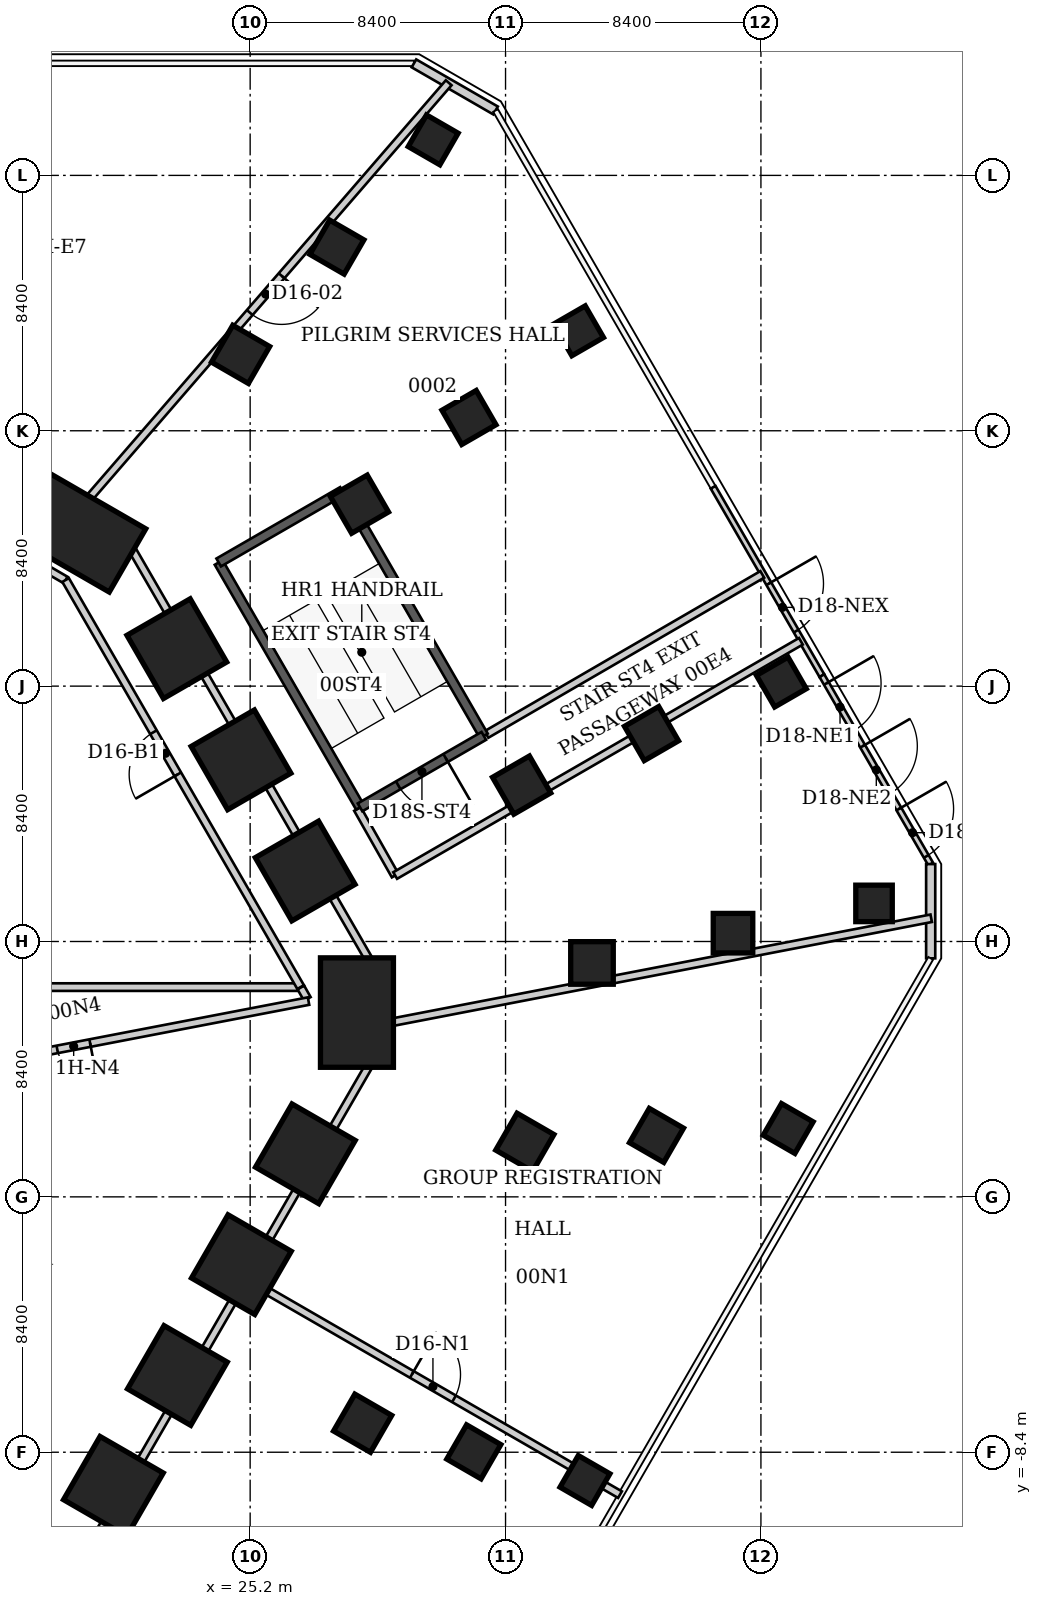
"""IFC4 building model, lengths in metres.
Left out: names, types, materials, properties, quantities, classifications, styles, units other than length and angle.
Written with IfcOpenShell. Run it as: python <this file> out.ifc"""

import sys

from ifc_helpers import new_model, si_unit, direction, frame, frame_2d, origin, origin_2d, place, context, subcontext, project, spatial, rectangle, extrude, element, fill, save


model = new_model("IFC4")
c1 = context("Model", 3, precision=1e-05, world=origin(), true_north=direction((0.0, 1.0)))
c2 = subcontext(c1, "Body", "Model", "MODEL_VIEW")
j1 = project(units=[si_unit("LENGTHUNIT", "METRE"), si_unit("PLANEANGLEUNIT", "RADIAN")], contexts=[c1])
p1 = place(None, origin())
s1 = spatial("IfcSite", under=j1, at=p1, CompositionType="ELEMENT")
p2 = place(p1, origin())
s2 = spatial("IfcBuilding", under=s1, at=p2, CompositionType="ELEMENT")
p3 = place(p2, origin())
s3 = spatial("IfcBuildingStorey", under=s2, at=p3, CompositionType="ELEMENT", Elevation=0.0)
p4 = place(p3, frame((19.606, 21.835, -0.2), z_axis=(0.0, 0.0, 1.0), x_axis=(0.5, 0.866025403784, 0.0)))
e1 = element("IfcColumn", 1, at=p4, inside=s3, PredefinedType="COLUMN", context=c2, shape_type="SweptSolid", body=[
    extrude(rectangle(XDim=2.4, YDim=3.6, at=origin_2d()), origin(), (0.0, 0.0, 1.0), 6.2),
])
for number, where, z_axis, x_axis in (
    (2, (22.788, 18.032, -0.2), (0.0, 0.0, 1.0), (0.866, 0.5, 0.0)),
    (3, (24.899, 14.375, -0.2), (0.0, 0.0, 1.0), (0.866, 0.5, 0.0)),
    (4, (27.01, 10.719, -0.2), (0.0, 0.0, 1.0), (0.866, 0.5, 0.0)),
):
    element("IfcColumn", number, at=place(p3, frame(where, z_axis=z_axis, x_axis=x_axis)), inside=s3, PredefinedType="COLUMN", context=c2, shape_type="SweptSolid", body=[
        extrude(rectangle(XDim=2.4, YDim=2.4, at=origin_2d()), origin(), (0.0, 0.0, 1.0), 6.2),
    ])
p5 = place(p3, frame((28.713, 6.062, -0.2), z_axis=(0.0, 0.0, 1.0), x_axis=(1.0, 0.0, 0.0)))
e5 = element("IfcColumn", 5, at=p5, inside=s3, PredefinedType="COLUMN", context=c2, shape_type="SweptSolid", body=[
    extrude(rectangle(XDim=2.4, YDim=3.6, at=origin_2d()), origin(), (0.0, 0.0, 1.0), 6.2),
])
for number, where, z_axis, x_axis in (
    (6, (27.016, 1.416, -0.2), (0.0, 0.0, 1.0), (0.866, -0.5, 0.0)),
    (7, (24.911, -2.23, -0.2), (0.0, 0.0, 1.0), (0.866, -0.5, 0.0)),
    (8, (22.806, -5.875, -0.2), (0.0, 0.0, 1.0), (0.866, -0.5, 0.0)),
    (9, (20.701, -9.521, -0.2), (0.0, 0.0, 1.0), (0.866, -0.5, 0.0)),
):
    element("IfcColumn", number, at=place(p3, frame(where, z_axis=z_axis, x_axis=x_axis)), inside=s3, PredefinedType="COLUMN", context=c2, shape_type="SweptSolid", body=[
        extrude(rectangle(XDim=2.4, YDim=2.4, at=origin_2d()), origin(), (0.0, 0.0, 1.0), 6.2),
    ])
for number, where, z_axis, x_axis in (
    (10, (24.885, 27.714, -0.2), (0.0, 0.0, 1.0), (0.5, 0.866, 0.0)),
    (11, (28.794, 22.785, -0.2), (0.0, 0.0, 1.0), (0.866, 0.5, 0.0)),
    (12, (34.129, 13.544, -0.2), (0.0, 0.0, 1.0), (0.866, 0.5, 0.0)),
    (13, (36.443, 7.694, -0.2), (0.0, 0.0, 1.0), (1.0, 0.0, 0.0)),
    (14, (34.235, 1.795, -0.2), (0.0, 0.0, 1.0), (0.866, -0.5, 0.0)),
    (15, (28.9, -7.445, -0.2), (0.0, 0.0, 1.0), (0.866, -0.5, 0.0)),
):
    element("IfcColumn", number, at=place(p3, frame(where, z_axis=z_axis, x_axis=x_axis)), inside=s3, PredefinedType="COLUMN", context=c2, shape_type="SweptSolid", body=[
        extrude(rectangle(XDim=1.4, YDim=1.4, at=origin_2d()), origin(), (0.0, 0.0, 1.0), 6.2),
    ])
for number, where, z_axis, x_axis in (
    (16, (28.052, 31.241, -0.2), (0.0, 0.0, 1.0), (0.5, 0.866, 0.0)),
    (17, (32.397, 25.636, -0.2), (0.0, 0.0, 1.0), (0.866, 0.5, 0.0)),
    (18, (38.4, 15.239, -0.2), (0.0, 0.0, 1.0), (0.866, 0.5, 0.0)),
    (19, (41.082, 8.674, -0.2), (0.0, 0.0, 1.0), (1.0, 0.0, 0.0)),
    (20, (38.566, 2.022, -0.2), (0.0, 0.0, 1.0), (0.866, -0.5, 0.0)),
    (21, (32.556, -8.387, -0.2), (0.0, 0.0, 1.0), (0.866, -0.5, 0.0)),
):
    element("IfcColumn", number, at=place(p3, frame(where, z_axis=z_axis, x_axis=x_axis)), inside=s3, PredefinedType="COLUMN", context=c2, shape_type="SweptSolid", body=[
        extrude(rectangle(XDim=1.3, YDim=1.3, at=origin_2d()), origin(), (0.0, 0.0, 1.0), 6.2),
    ])
for number, where, z_axis, x_axis in (
    (22, (31.22, 34.768, -0.2), (0.0, 0.0, 1.0), (0.5, 0.866, 0.0)),
    (23, (36.001, 28.488, -0.2), (0.0, 0.0, 1.0), (0.866, 0.5, 0.0)),
    (24, (42.672, 16.934, -0.2), (0.0, 0.0, 1.0), (0.866, 0.5, 0.0)),
    (25, (45.72, 9.653, -0.2), (0.0, 0.0, 1.0), (1.0, 0.0, 0.0)),
    (26, (42.897, 2.249, -0.2), (0.0, 0.0, 1.0), (0.866, -0.5, 0.0)),
    (27, (36.212, -9.329, -0.2), (0.0, 0.0, 1.0), (0.866, -0.5, 0.0)),
):
    element("IfcColumn", number, at=place(p3, frame(where, z_axis=z_axis, x_axis=x_axis)), inside=s3, PredefinedType="COLUMN", context=c2, shape_type="SweptSolid", body=[
        extrude(rectangle(XDim=1.2, YDim=1.2, at=origin_2d()), origin(), (0.0, 0.0, 1.0), 6.2),
    ])
p6 = place(p3, frame((30.587, 37.285, 0.0), z_axis=(0.0, 0.0, 1.0), x_axis=(0.866063626216, -0.499933790963, 0.0)))
e28 = element("IfcWall", 28, at=p6, inside=s3, PredefinedType="SOLIDWALL", context=c2, shape_type="SweptSolid", body=[
    extrude(rectangle(XDim=3.1, YDim=0.3, at=frame_2d((1.55, 0.0))), origin(), (0.0, 0.0, 1.0), 5.84),
])
p7 = place(p3, frame((40.428, 23.341, 0.0), z_axis=(0.0, 0.0, 1.0), x_axis=(0.499988249127, -0.866032188048, 0.0)))
e29 = element("IfcWall", 29, at=p7, inside=s3, PredefinedType="SOLIDWALL", context=c2, shape_type="SweptSolid", body=[
    extrude(rectangle(XDim=7.156, YDim=0.18, at=frame_2d((3.578, 0.0))), origin(), (0.0, 0.0, 1.0), 5.84),
])
p8 = place(p7, frame((3.661, 0.0, 0.0)))
e30 = element("IfcOpeningElement", 30, at=p8, cuts=e29, PredefinedType="OPENING", context=c2, shape_type="SweptSolid", body=[
    extrude(rectangle(XDim=1.8, YDim=2.7, at=frame_2d((0.9, 1.35))), frame((0.0, 0.09, 0.0), z_axis=(0.0, -1.0, 0.0), x_axis=(1.0, 0.0, 0.0)), (0.0, 0.0, 1.0), 0.18),
])
p9 = place(p3, frame((44.006, 17.144, 0.0), z_axis=(0.0, 0.0, 1.0), x_axis=(0.500013836808, -0.866017414952, 0.0)))
e31 = element("IfcWall", 31, at=p9, inside=s3, PredefinedType="SOLIDWALL", context=c2, shape_type="SweptSolid", body=[
    extrude(rectangle(XDim=7.156, YDim=0.18, at=frame_2d((3.578, 0.0))), origin(), (0.0, 0.0, 1.0), 5.84),
])
p10 = place(p9, frame((0.293, 0.0, 0.0)))
e32 = element("IfcOpeningElement", 32, at=p10, cuts=e31, PredefinedType="OPENING", context=c2, shape_type="SweptSolid", body=[
    extrude(rectangle(XDim=1.8, YDim=2.7, at=frame_2d((0.9, 1.35))), frame((0.0, 0.09, 0.0), z_axis=(0.0, -1.0, 0.0), x_axis=(1.0, 0.0, 0.0)), (0.0, 0.0, 1.0), 0.18),
])
p11 = place(p9, frame((2.678, 0.0, 0.0)))
e33 = element("IfcOpeningElement", 33, at=p11, cuts=e31, PredefinedType="OPENING", context=c2, shape_type="SweptSolid", body=[
    extrude(rectangle(XDim=1.8, YDim=2.7, at=frame_2d((0.9, 1.35))), frame((0.0, 0.09, 0.0), z_axis=(0.0, -1.0, 0.0), x_axis=(1.0, 0.0, 0.0)), (0.0, 0.0, 1.0), 0.18),
])
p12 = place(p9, frame((5.063, 0.0, 0.0)))
e34 = element("IfcOpeningElement", 34, at=p12, cuts=e31, PredefinedType="OPENING", context=c2, shape_type="SweptSolid", body=[
    extrude(rectangle(XDim=1.8, YDim=2.7, at=frame_2d((0.9, 1.35))), frame((0.0, 0.09, 0.0), z_axis=(0.0, -1.0, 0.0), x_axis=(1.0, 0.0, 0.0)), (0.0, 0.0, 1.0), 0.18),
])
p13 = place(p3, frame((47.584, 10.946, 0.0), z_axis=(0.0, 0.0, 1.0), x_axis=(0.0, -1.0, 0.0)))
e35 = element("IfcWall", 35, at=p13, inside=s3, PredefinedType="SOLIDWALL", context=c2, shape_type="SweptSolid", body=[
    extrude(rectangle(XDim=3.1, YDim=0.3, at=frame_2d((1.55, 0.0))), origin(), (0.0, 0.0, 1.0), 5.84),
])
p14 = place(p3, frame((17.07, -16.52, 0.0), z_axis=(0.0, 0.0, 1.0), x_axis=(0.500243727505, 0.865884641908, 0.0)))
e36 = element("IfcWall", 36, at=p14, inside=s3, PredefinedType="PARTITIONING", context=c2, shape_type="SweptSolid", body=[
    extrude(rectangle(XDim=15.972, YDim=0.25, at=frame_2d((7.986, 0.0))), origin(), (0.0, 0.0, 1.0), 4.04),
])
p15 = place(p3, frame((18.51, 20.65, 0.0), z_axis=(0.0, 0.0, 1.0), x_axis=(0.864827114446, -0.502069778138, 0.0)))
e37 = element("IfcWall", 37, at=p15, inside=s3, PredefinedType="PARTITIONING", context=c2, shape_type="SweptSolid", body=[
    extrude(rectangle(XDim=0.717, YDim=0.25, at=frame_2d((0.358, 0.0))), origin(), (0.0, 0.0, 1.0), 5.84),
])
p16 = place(p3, frame((19.15, 23.05, 0.0), z_axis=(0.0, 0.0, 1.0), x_axis=(-1.0, 0.0, 0.0)))
e38 = element("IfcWall", 38, at=p16, inside=s3, PredefinedType="PARTITIONING", context=c2, shape_type="SweptSolid", body=[
    extrude(rectangle(XDim=15.15, YDim=0.25, at=frame_2d((7.575, 0.0))), origin(), (0.0, 0.0, 1.0), 4.04),
])
p17 = place(p3, frame((19.15, 23.05, 0.0), z_axis=(0.0, 0.0, 1.0), x_axis=(0.86570107998, -0.500561325036, 0.0)))
e39 = element("IfcWall", 39, at=p17, inside=s3, PredefinedType="PARTITIONING", context=c2, shape_type="SweptSolid", body=[
    extrude(rectangle(XDim=0.588, YDim=0.25, at=frame_2d((0.294, 0.0))), origin(), (0.0, 0.0, 1.0), 5.84),
])
p18 = place(p3, frame((19.69, 22.74, 0.0), z_axis=(0.0, 0.0, 1.0), x_axis=(0.865102050426, -0.501595895466, 0.0)))
e40 = element("IfcWall", 40, at=p18, inside=s3, PredefinedType="PARTITIONING", context=c2, shape_type="SweptSolid", body=[
    extrude(rectangle(XDim=1.375, YDim=0.25, at=frame_2d((0.688, 0.0))), origin(), (0.0, 0.0, 1.0), 5.84),
])
p19 = place(p3, frame((25.06, -2.69, 0.0), z_axis=(0.0, 0.0, 1.0), x_axis=(0.500462066422, 0.865758465204, 0.0)))
e41 = element("IfcWall", 41, at=p19, inside=s3, PredefinedType="PARTITIONING", context=c2, shape_type="SweptSolid", body=[
    extrude(rectangle(XDim=8.952, YDim=0.25, at=frame_2d((4.476, 0.0))), origin(), (0.0, 0.0, 1.0), 4.04),
])
p20 = place(p3, frame((25.06, -2.69, 0.0), z_axis=(0.0, 0.0, 1.0), x_axis=(0.865986126124, -0.500068024733, 0.0)))
e42 = element("IfcWall", 42, at=p20, inside=s3, PredefinedType="PARTITIONING", context=c2, shape_type="SweptSolid", body=[
    extrude(rectangle(XDim=14.208, YDim=0.25, at=frame_2d((7.104, 0.0))), origin(), (0.0, 0.0, 1.0), 5.75),
])
p21 = place(p20, frame((6.304, 0.0, 0.0)))
e43 = element("IfcOpeningElement", 43, at=p21, cuts=e42, PredefinedType="OPENING", context=c2, shape_type="SweptSolid", body=[
    extrude(rectangle(XDim=1.6, YDim=2.4, at=frame_2d((0.8, 1.2))), frame((0.0, 0.125, 0.0), z_axis=(0.0, -1.0, 0.0), x_axis=(1.0, 0.0, 0.0)), (0.0, 0.0, 1.0), 0.25),
])
p22 = place(p3, frame((26.85, 6.9, 0.0), z_axis=(0.0, 0.0, 1.0), x_axis=(-1.0, 0.0, 0.0)))
e44 = element("IfcWall", 44, at=p22, inside=s3, PredefinedType="PARTITIONING", context=c2, shape_type="SweptSolid", body=[
    extrude(rectangle(XDim=15.18, YDim=0.25, at=frame_2d((7.59, 0.0))), origin(), (0.0, 0.0, 1.0), 5.84),
])
p23 = place(p3, frame((26.86, 6.9, 0.0), z_axis=(0.0, 0.0, 1.0), x_axis=(-0.499972135205, 0.866041490934, 0.0)))
e45 = element("IfcWall", 45, at=p23, inside=s3, PredefinedType="PARTITIONING", context=c2, shape_type="SweptSolid", body=[
    extrude(rectangle(XDim=15.461, YDim=0.25, at=frame_2d((7.731, 0.0))), origin(), (0.0, 0.0, 1.0), 5.84),
])
p24 = place(p23, frame((8.081, 0.0, 0.0)))
e46 = element("IfcOpeningElement", 46, at=p24, cuts=e45, PredefinedType="OPENING", context=c2, shape_type="SweptSolid", body=[
    extrude(rectangle(XDim=1.6, YDim=2.4, at=frame_2d((0.8, 1.2))), frame((0.0, 0.125, 0.0), z_axis=(0.0, -1.0, 0.0), x_axis=(1.0, 0.0, 0.0)), (0.0, 0.0, 1.0), 0.25),
])
p25 = place(p3, frame((26.867, 6.887, 0.0), z_axis=(0.0, 0.0, 1.0), x_axis=(0.49170458892, -0.870762078432, 0.0)))
e47 = element("IfcWall", 47, at=p25, inside=s3, PredefinedType="PARTITIONING", context=c2, shape_type="SweptSolid", body=[
    extrude(rectangle(XDim=0.433, YDim=0.25, at=frame_2d((0.217, 0.0))), origin(), (0.0, 0.0, 1.0), 5.84),
])
p26 = place(p3, frame((27.12, 6.44, 0.0), z_axis=(0.0, 0.0, 1.0), x_axis=(-0.982020832849, -0.188772571765, 0.0)))
e48 = element("IfcWall", 48, at=p26, inside=s3, PredefinedType="PARTITIONING", context=c2, shape_type="SweptSolid", body=[
    extrude(rectangle(XDim=15.733, YDim=0.25, at=frame_2d((7.867, 0.0))), origin(), (0.0, 0.0, 1.0), 5.84),
])
p27 = place(p26, frame((7.316, 0.0, 0.0)))
e49 = element("IfcOpeningElement", 49, at=p27, cuts=e48, PredefinedType="OPENING", context=c2, shape_type="SweptSolid", body=[
    extrude(rectangle(XDim=1.1, YDim=2.2, at=frame_2d((0.55, 1.1))), frame((0.0, 0.125, 0.0), z_axis=(0.0, -1.0, 0.0), x_axis=(1.0, 0.0, 0.0)), (0.0, 0.0, 1.0), 0.25),
])
p28 = place(p3, frame((28.73, 12.76, 0.0), z_axis=(0.0, 0.0, 1.0), x_axis=(0.492718818431, -0.87018858069, 0.0)))
e50 = element("IfcWall", 50, at=p28, inside=s3, PredefinedType="PARTITIONING", context=c2, shape_type="SweptSolid", body=[
    extrude(rectangle(XDim=2.517, YDim=0.25, at=frame_2d((1.258, 0.0))), origin(), (0.0, 0.0, 1.0), 5.84),
])
p29 = place(p3, frame((29.54, 5.06, 0.0), z_axis=(0.0, 0.0, 1.0), x_axis=(0.0, 1.0, 0.0)))
e51 = element("IfcWall", 51, at=p29, inside=s3, PredefinedType="PARTITIONING", context=c2, shape_type="SweptSolid", body=[
    extrude(rectangle(XDim=0.585, YDim=0.25, at=frame_2d((0.292, 0.0))), origin(), (0.0, 0.0, 1.0), 5.84),
])
p30 = place(p3, frame((29.54, 5.68, 0.0), z_axis=(0.0, 0.0, 1.0), x_axis=(0.0, 1.0, 0.0)))
e52 = element("IfcWall", 52, at=p30, inside=s3, PredefinedType="PARTITIONING", context=c2, shape_type="SweptSolid", body=[
    extrude(rectangle(XDim=1.38, YDim=0.25, at=frame_2d((0.69, 0.0))), origin(), (0.0, 0.0, 1.0), 5.84),
])
p31 = place(p3, frame((29.54, 7.06, 0.0), z_axis=(0.0, 0.0, 1.0), x_axis=(-0.500235539918, 0.865889372035, 0.0)))
e53 = element("IfcWall", 53, at=p31, inside=s3, PredefinedType="PARTITIONING", context=c2, shape_type="SweptSolid", body=[
    extrude(rectangle(XDim=17.312, YDim=0.25, at=frame_2d((8.656, 0.0))), origin(), (0.0, 0.0, 1.0), 4.04),
])
p32 = place(p3, frame((29.97, 10.57, 0.0), z_axis=(0.0, 0.0, 1.0), x_axis=(0.866006423824, 0.500032872815, 0.0)))
e54 = element("IfcWall", 54, at=p32, inside=s3, PredefinedType="PARTITIONING", context=c2, shape_type="SweptSolid", body=[
    extrude(rectangle(XDim=15.409, YDim=0.25, at=frame_2d((7.704, 0.0))), origin(), (0.0, 0.0, 1.0), 5.083),
])
p33 = place(p3, frame((31.73, 36.647, 0.0), z_axis=(0.0, 0.0, 1.0), x_axis=(-0.654545432473, -0.75602266952, 0.0)))
e55 = element("IfcWall", 55, at=p33, inside=s3, PredefinedType="PARTITIONING", context=c2, shape_type="SweptSolid", body=[
    extrude(rectangle(XDim=18.395, YDim=0.25, at=frame_2d((9.198, 0.0))), origin(), (0.0, 0.0, 1.0), 5.75),
])
p34 = place(p33, frame((8.398, 0.0, 0.0)))
e56 = element("IfcOpeningElement", 56, at=p34, cuts=e55, PredefinedType="OPENING", context=c2, shape_type="SweptSolid", body=[
    extrude(rectangle(XDim=1.6, YDim=2.4, at=frame_2d((0.8, 1.2))), frame((0.0, 0.125, 0.0), z_axis=(0.0, -1.0, 0.0), x_axis=(1.0, 0.0, 0.0)), (0.0, 0.0, 1.0), 0.25),
])
p35 = place(p3, frame((42.044, 20.475, 0.0), z_axis=(0.0, 0.0, 1.0), x_axis=(-0.864887716018, -0.501965375978, 0.0)))
e57 = element("IfcWall", 57, at=p35, inside=s3, PredefinedType="PARTITIONING", context=c2, shape_type="SweptSolid", body=[
    extrude(rectangle(XDim=10.49, YDim=0.25, at=frame_2d((5.245, 0.0))), origin(), (0.0, 0.0, 1.0), 5.75),
])
p36 = place(p3, frame((47.601, 9.164, 0.0), z_axis=(0.0, 0.0, 1.0), x_axis=(-0.981893421599, -0.189434180181, 0.0)))
e58 = element("IfcWall", 58, at=p36, inside=s3, PredefinedType="PARTITIONING", context=c2, shape_type="SweptSolid", body=[
    extrude(rectangle(XDim=18.394, YDim=0.25, at=frame_2d((9.197, 0.0))), origin(), (0.0, 0.0, 1.0), 5.75),
])
p37 = place(p3, frame((28.815, 12.813, 0.0), z_axis=(0.0, 0.0, 1.0), x_axis=(-0.500015592816, 0.866016401081, 0.0)))
e59 = element("IfcWall", 59, at=p37, inside=s3, PredefinedType="SHEAR", context=c2, shape_type="SweptSolid", body=[
    extrude(rectangle(XDim=9.3, YDim=0.3, at=frame_2d((4.65, 0.0))), origin(), (0.0, 0.0, 1.0), 6.0),
])
p38 = place(p3, frame((24.165, 20.867, 0.0), z_axis=(0.0, 0.0, 1.0), x_axis=(0.866016039709, 0.500016218704, 0.0)))
e60 = element("IfcWall", 60, at=p38, inside=s3, PredefinedType="SHEAR", context=c2, shape_type="SweptSolid", body=[
    extrude(rectangle(XDim=4.7, YDim=0.3, at=frame_2d((2.35, 0.0))), origin(), (0.0, 0.0, 1.0), 6.0),
])
p39 = place(p3, frame((28.235, 23.217, 0.0), z_axis=(0.0, 0.0, 1.0), x_axis=(0.500004225487, -0.866022964185, 0.0)))
e61 = element("IfcWall", 61, at=p39, inside=s3, PredefinedType="SHEAR", context=c2, shape_type="SweptSolid", body=[
    extrude(rectangle(XDim=9.3, YDim=0.3, at=frame_2d((4.65, 0.0))), origin(), (0.0, 0.0, 1.0), 6.0),
])
p40 = place(p3, frame((32.885, 15.163, 0.0), z_axis=(0.0, 0.0, 1.0), x_axis=(-0.866038532462, -0.499977259774, 0.0)))
e62 = element("IfcWall", 62, at=p40, inside=s3, PredefinedType="SHEAR", context=c2, shape_type="SweptSolid", body=[
    extrude(rectangle(XDim=4.7, YDim=0.3, at=frame_2d((2.35, 0.0))), origin(), (0.0, 0.0, 1.0), 6.0),
])
p41 = place(p40, frame((1.45, 0.0, 0.0)))
e63 = element("IfcOpeningElement", 63, at=p41, cuts=e62, PredefinedType="OPENING", context=c2, shape_type="SweptSolid", body=[
    extrude(rectangle(XDim=1.8, YDim=2.4, at=frame_2d((0.9, 1.2))), frame((0.0, 0.15, 0.0), z_axis=(0.0, -1.0, 0.0), x_axis=(1.0, 0.0, 0.0)), (0.0, 0.0, 1.0), 0.3),
])
p42 = place(p8, origin())
e64 = element("IfcDoor", 64, at=p42, inside=s3, OperationType="SINGLE_SWING_LEFT", PredefinedType="DOOR", context=c2, shape_type="SweptSolid", body=[
    extrude(rectangle(XDim=1.8, YDim=2.7, at=frame_2d((0.9, 1.35))), frame((0.0, 0.025, 0.0), z_axis=(0.0, -1.0, 0.0), x_axis=(1.0, 0.0, 0.0)), (0.0, 0.0, 1.0), 0.05),
])
fill(e30, e64)
p43 = place(p10, origin())
e65 = element("IfcDoor", 65, at=p43, inside=s3, OperationType="SINGLE_SWING_LEFT", PredefinedType="DOOR", context=c2, shape_type="SweptSolid", body=[
    extrude(rectangle(XDim=1.8, YDim=2.7, at=frame_2d((0.9, 1.35))), frame((0.0, 0.025, 0.0), z_axis=(0.0, -1.0, 0.0), x_axis=(1.0, 0.0, 0.0)), (0.0, 0.0, 1.0), 0.05),
])
fill(e32, e65)
p44 = place(p11, origin())
e66 = element("IfcDoor", 66, at=p44, inside=s3, OperationType="SINGLE_SWING_LEFT", PredefinedType="DOOR", context=c2, shape_type="SweptSolid", body=[
    extrude(rectangle(XDim=1.8, YDim=2.7, at=frame_2d((0.9, 1.35))), frame((0.0, 0.025, 0.0), z_axis=(0.0, -1.0, 0.0), x_axis=(1.0, 0.0, 0.0)), (0.0, 0.0, 1.0), 0.05),
])
fill(e33, e66)
p45 = place(p12, origin())
e67 = element("IfcDoor", 67, at=p45, inside=s3, OperationType="SINGLE_SWING_LEFT", PredefinedType="DOOR", context=c2, shape_type="SweptSolid", body=[
    extrude(rectangle(XDim=1.8, YDim=2.7, at=frame_2d((0.9, 1.35))), frame((0.0, 0.025, 0.0), z_axis=(0.0, -1.0, 0.0), x_axis=(1.0, 0.0, 0.0)), (0.0, 0.0, 1.0), 0.05),
])
fill(e34, e67)
p46 = place(p34, origin())
e68 = element("IfcDoor", 68, at=p46, inside=s3, OperationType="DOUBLE_DOOR_SINGLE_SWING", PredefinedType="DOOR", context=c2, shape_type="SweptSolid", body=[
    extrude(rectangle(XDim=1.6, YDim=2.4, at=frame_2d((0.8, 1.2))), frame((0.0, 0.025, 0.0), z_axis=(0.0, -1.0, 0.0), x_axis=(1.0, 0.0, 0.0)), (0.0, 0.0, 1.0), 0.05),
])
fill(e56, e68)
p47 = place(p24, origin())
e69 = element("IfcDoor", 69, at=p47, inside=s3, OperationType="DOUBLE_DOOR_SINGLE_SWING", PredefinedType="DOOR", context=c2, shape_type="SweptSolid", body=[
    extrude(rectangle(XDim=1.6, YDim=2.4, at=frame_2d((0.8, 1.2))), frame((0.0, 0.025, 0.0), z_axis=(0.0, -1.0, 0.0), x_axis=(1.0, 0.0, 0.0)), (0.0, 0.0, 1.0), 0.05),
])
fill(e46, e69)
p48 = place(p21, origin())
e70 = element("IfcDoor", 70, at=p48, inside=s3, OperationType="DOUBLE_DOOR_SINGLE_SWING", PredefinedType="DOOR", context=c2, shape_type="SweptSolid", body=[
    extrude(rectangle(XDim=1.6, YDim=2.4, at=frame_2d((0.8, 1.2))), frame((0.0, 0.025, 0.0), z_axis=(0.0, -1.0, 0.0), x_axis=(1.0, 0.0, 0.0)), (0.0, 0.0, 1.0), 0.05),
])
fill(e43, e70)
p49 = place(p27, origin())
e71 = element("IfcDoor", 71, at=p49, inside=s3, OperationType="SINGLE_SWING_LEFT", PredefinedType="DOOR", context=c2, shape_type="SweptSolid", body=[
    extrude(rectangle(XDim=1.1, YDim=2.2, at=frame_2d((0.55, 1.1))), frame((0.0, 0.025, 0.0), z_axis=(0.0, -1.0, 0.0), x_axis=(1.0, 0.0, 0.0)), (0.0, 0.0, 1.0), 0.05),
])
fill(e49, e71)
p50 = place(p41, origin())
e72 = element("IfcDoor", 72, at=p50, inside=s3, OperationType="DOUBLE_DOOR_SINGLE_SWING", PredefinedType="DOOR", context=c2, shape_type="SweptSolid", body=[
    extrude(rectangle(XDim=1.8, YDim=2.4, at=frame_2d((0.9, 1.2))), frame((0.0, 0.025, 0.0), z_axis=(0.0, -1.0, 0.0), x_axis=(1.0, 0.0, 0.0)), (0.0, 0.0, 1.0), 0.05),
])
fill(e63, e72)
save(model, sys.argv[1])
